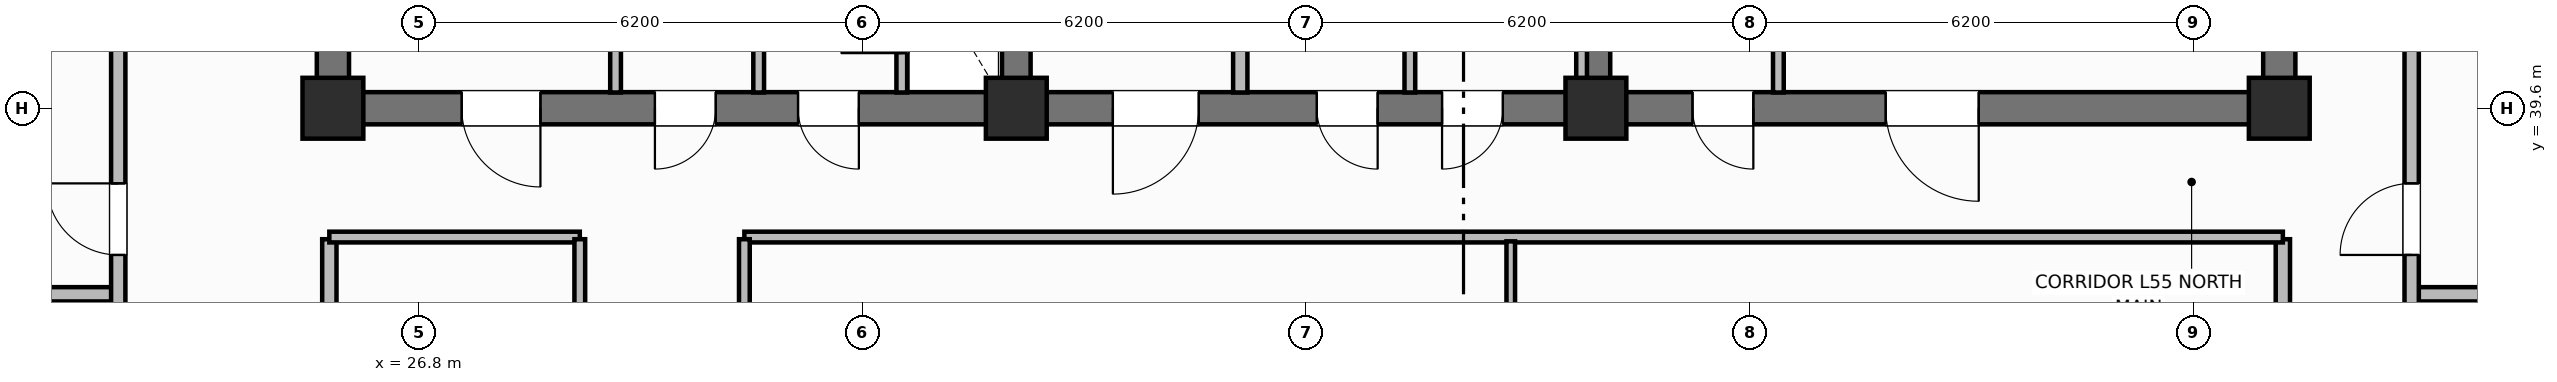
"""IFC4 building model, lengths in metres.
Left out: names, types, materials, properties, quantities, classifications, styles, units other than length and angle.
Written with IfcOpenShell. Run it as: python <this file> out.ifc"""

import sys

from ifc_helpers import new_model, si_unit, direction, frame, frame_2d, origin, origin_2d, place, context, subcontext, project, spatial, rectangle, extrude, element, fill, save


model = new_model("IFC4")
c1 = context("Model", 3, precision=1e-05, world=origin(), true_north=direction((0.0, 1.0)))
c2 = subcontext(c1, "Body", "Model", "MODEL_VIEW")
j1 = project(units=[si_unit("LENGTHUNIT", "METRE"), si_unit("PLANEANGLEUNIT", "RADIAN")], contexts=[c1])
p1 = place(None, origin())
s1 = spatial("IfcSite", under=j1, at=p1, CompositionType="ELEMENT")
p2 = place(p1, origin())
s2 = spatial("IfcBuilding", under=s1, at=p2, CompositionType="ELEMENT")
p3 = place(p2, frame((0.0, 0.0, 222.1)))
s3 = spatial("IfcBuildingStorey", under=s2, at=p3, CompositionType="ELEMENT", Elevation=222.1)
for number, where, z_axis, x_axis in (
    (1, (25.6, 39.825, 0.0), (0.0, 0.0, 1.0), (0.0, 1.0, 0.0)),
    (2, (52.8, 39.825, 0.0), (0.0, 0.0, 1.0), (0.0, 1.0, 0.0)),
):
    element("IfcWall", number, at=place(p3, frame(where, z_axis=z_axis, x_axis=x_axis)), inside=s3, PredefinedType="SHEAR", context=c2, shape_type="SweptSolid", body=[
        extrude(rectangle(XDim=5.75, YDim=0.45, at=frame_2d((2.875, 0.0))), origin(), (0.0, 0.0, 1.0), 3.7),
    ])
p4 = place(p3, frame((52.8, 39.6, 0.0), z_axis=(0.0, 0.0, 1.0), x_axis=(-1.0, 0.0, 0.0)))
e3 = element("IfcWall", 3, at=p4, inside=s3, PredefinedType="SHEAR", context=c2, shape_type="SweptSolid", body=[
    extrude(rectangle(XDim=27.2, YDim=0.45, at=frame_2d((13.6, 0.0))), origin(), (0.0, 0.0, 1.0), 3.7),
])
p5 = place(p4, frame((24.3, 0.0, 0.0)))
e4 = element("IfcOpeningElement", 4, at=p5, cuts=e3, PredefinedType="OPENING", context=c2, shape_type="SweptSolid", body=[
    extrude(rectangle(XDim=1.1, YDim=2.15, at=frame_2d((0.55, 1.075))), frame((0.0, 0.235, 0.0), z_axis=(0.0, -1.0, 0.0), x_axis=(1.0, 0.0, 0.0)), (0.0, 0.0, 1.0), 0.47),
])
p6 = place(p4, frame((21.85, 0.0, 0.0)))
e5 = element("IfcOpeningElement", 5, at=p6, cuts=e3, PredefinedType="OPENING", context=c2, shape_type="SweptSolid", body=[
    extrude(rectangle(XDim=0.85, YDim=2.1, at=frame_2d((0.425, 1.05))), frame((0.0, 0.235, 0.0), z_axis=(0.0, -1.0, 0.0), x_axis=(1.0, 0.0, 0.0)), (0.0, 0.0, 1.0), 0.47),
])
p7 = place(p4, frame((19.85, 0.0, 0.0)))
e6 = element("IfcOpeningElement", 6, at=p7, cuts=e3, PredefinedType="OPENING", context=c2, shape_type="SweptSolid", body=[
    extrude(rectangle(XDim=0.85, YDim=2.1, at=frame_2d((0.425, 1.05))), frame((0.0, 0.235, 0.0), z_axis=(0.0, -1.0, 0.0), x_axis=(1.0, 0.0, 0.0)), (0.0, 0.0, 1.0), 0.47),
])
p8 = place(p4, frame((15.1, 0.0, 0.0)))
e7 = element("IfcOpeningElement", 7, at=p8, cuts=e3, PredefinedType="OPENING", context=c2, shape_type="SweptSolid", body=[
    extrude(rectangle(XDim=1.2, YDim=2.15, at=frame_2d((0.6, 1.075))), frame((0.0, 0.235, 0.0), z_axis=(0.0, -1.0, 0.0), x_axis=(1.0, 0.0, 0.0)), (0.0, 0.0, 1.0), 0.47),
])
p9 = place(p4, frame((12.6, 0.0, 0.0)))
e8 = element("IfcOpeningElement", 8, at=p9, cuts=e3, PredefinedType="OPENING", context=c2, shape_type="SweptSolid", body=[
    extrude(rectangle(XDim=0.85, YDim=2.1, at=frame_2d((0.425, 1.05))), frame((0.0, 0.235, 0.0), z_axis=(0.0, -1.0, 0.0), x_axis=(1.0, 0.0, 0.0)), (0.0, 0.0, 1.0), 0.47),
])
p10 = place(p4, frame((10.85, 0.0, 0.0)))
e9 = element("IfcOpeningElement", 9, at=p10, cuts=e3, PredefinedType="OPENING", context=c2, shape_type="SweptSolid", body=[
    extrude(rectangle(XDim=0.85, YDim=2.1, at=frame_2d((0.425, 1.05))), frame((0.0, 0.235, 0.0), z_axis=(0.0, -1.0, 0.0), x_axis=(1.0, 0.0, 0.0)), (0.0, 0.0, 1.0), 0.47),
])
p11 = place(p4, frame((7.35, 0.0, 0.0)))
e10 = element("IfcOpeningElement", 10, at=p11, cuts=e3, PredefinedType="OPENING", context=c2, shape_type="SweptSolid", body=[
    extrude(rectangle(XDim=0.85, YDim=2.1, at=frame_2d((0.425, 1.05))), frame((0.0, 0.235, 0.0), z_axis=(0.0, -1.0, 0.0), x_axis=(1.0, 0.0, 0.0)), (0.0, 0.0, 1.0), 0.47),
])
p12 = place(p4, frame((4.2, 0.0, 0.0)))
e11 = element("IfcOpeningElement", 11, at=p12, cuts=e3, PredefinedType="OPENING", context=c2, shape_type="SweptSolid", body=[
    extrude(rectangle(XDim=1.3, YDim=2.2, at=frame_2d((0.65, 1.1))), frame((0.0, 0.235, 0.0), z_axis=(0.0, -1.0, 0.0), x_axis=(1.0, 0.0, 0.0)), (0.0, 0.0, 1.0), 0.47),
])
for number, where, z_axis, x_axis in (
    (12, (35.15, 39.825, 0.0), (0.0, 0.0, 1.0), (0.0, 1.0, 0.0)),
    (13, (43.25, 39.825, 0.0), (0.0, 0.0, 1.0), (0.0, 1.0, 0.0)),
):
    element("IfcWall", number, at=place(p3, frame(where, z_axis=z_axis, x_axis=x_axis)), inside=s3, PredefinedType="SHEAR", context=c2, shape_type="SweptSolid", body=[
        extrude(rectangle(XDim=5.75, YDim=0.4, at=frame_2d((2.875, 0.0))), origin(), (0.0, 0.0, 1.0), 3.7),
    ])
for number, where, z_axis, x_axis in (
    (14, (25.6, 39.6, 0.0), (0.0, 0.0, 1.0), (1.0, 0.0, 0.0)),
    (15, (35.15, 39.6, 0.0), (0.0, 0.0, 1.0), (1.0, 0.0, 0.0)),
    (16, (43.25, 39.6, 0.0), (0.0, 0.0, 1.0), (1.0, 0.0, 0.0)),
    (17, (52.8, 39.6, 0.0), (0.0, 0.0, 1.0), (1.0, 0.0, 0.0)),
):
    element("IfcColumn", number, at=place(p3, frame(where, z_axis=z_axis, x_axis=x_axis)), inside=s3, PredefinedType="COLUMN", context=c2, shape_type="SweptSolid", body=[
        extrude(rectangle(XDim=0.85, YDim=0.85, at=origin_2d()), origin(), (0.0, 0.0, 1.0), 3.7),
    ])
p13 = place(p3, frame((33.55, 39.82, 0.0), z_axis=(0.0, 0.0, 1.0), x_axis=(0.0, 1.0, 0.0)))
e18 = element("IfcWall", 18, at=p13, inside=s3, PredefinedType="PARTITIONING", context=c2, shape_type="SweptSolid", body=[
    extrude(rectangle(XDim=2.13, YDim=0.15, at=frame_2d((1.065, 0.0))), origin(), (0.0, 0.0, 1.0), 2.24),
])
p14 = place(p13, frame((0.55, 0.0, 0.0)))
e19 = element("IfcOpeningElement", 19, at=p14, cuts=e18, PredefinedType="OPENING", context=c2, shape_type="SweptSolid", body=[
    extrude(rectangle(XDim=0.85, YDim=2.05, at=frame_2d((0.425, 1.025))), frame((0.0, 0.085, 0.0), z_axis=(0.0, -1.0, 0.0), x_axis=(1.0, 0.0, 0.0)), (0.0, 0.0, 1.0), 0.17),
])
for number, where, z_axis, x_axis in (
    (20, (29.55, 39.82, 0.0), (0.0, 0.0, 1.0), (0.0, 1.0, 0.0)),
    (21, (31.55, 39.82, 0.0), (0.0, 0.0, 1.0), (0.0, 1.0, 0.0)),
):
    element("IfcWall", number, at=place(p3, frame(where, z_axis=z_axis, x_axis=x_axis)), inside=s3, PredefinedType="PARTITIONING", context=c2, shape_type="SweptSolid", body=[
        extrude(rectangle(XDim=2.13, YDim=0.15, at=frame_2d((1.065, 0.0))), origin(), (0.0, 0.0, 1.0), 2.24),
    ])
p15 = place(p3, frame((38.28, 39.82, 0.0), z_axis=(0.0, 0.0, 1.0), x_axis=(0.0, 1.0, 0.0)))
e22 = element("IfcWall", 22, at=p15, inside=s3, PredefinedType="PARTITIONING", context=c2, shape_type="SweptSolid", body=[
    extrude(rectangle(XDim=5.63, YDim=0.2, at=frame_2d((2.815, 0.0))), origin(), (0.0, 0.0, 1.0), 2.24),
])
for number, where, z_axis, x_axis in (
    (23, (43.05, 39.82, 0.0), (0.0, 0.0, 1.0), (0.0, 1.0, 0.0)),
    (24, (40.65, 39.82, 0.0), (0.0, 0.0, 1.0), (0.0, 1.0, 0.0)),
    (25, (45.8, 39.82, 0.0), (0.0, 0.0, 1.0), (0.0, 1.0, 0.0)),
):
    element("IfcWall", number, at=place(p3, frame(where, z_axis=z_axis, x_axis=x_axis)), inside=s3, PredefinedType="PARTITIONING", context=c2, shape_type="SweptSolid", body=[
        extrude(rectangle(XDim=5.63, YDim=0.15, at=frame_2d((2.815, 0.0))), origin(), (0.0, 0.0, 1.0), 2.24),
    ])
for number, where, z_axis, x_axis in (
    (26, (25.55, 18.63, 0.0), (0.0, 0.0, 1.0), (0.0, 1.0, 0.0)),
    (27, (52.85, 18.63, 0.0), (0.0, 0.0, 1.0), (0.0, 1.0, 0.0)),
):
    element("IfcWall", number, at=place(p3, frame(where, z_axis=z_axis, x_axis=x_axis)), inside=s3, PredefinedType="PARTITIONING", context=c2, shape_type="SweptSolid", body=[
        extrude(rectangle(XDim=19.14, YDim=0.2, at=frame_2d((9.57, 0.0))), origin(), (0.0, 0.0, 1.0), 2.24),
    ])
p16 = place(p3, frame((25.55, 37.8, 0.0), z_axis=(0.0, 0.0, 1.0), x_axis=(1.0, 0.0, 0.0)))
e28 = element("IfcWall", 28, at=p16, inside=s3, PredefinedType="PARTITIONING", context=c2, shape_type="SweptSolid", body=[
    extrude(rectangle(XDim=3.5, YDim=0.15, at=frame_2d((1.75, 0.0))), origin(), (0.0, 0.0, 1.0), 2.24),
])
p17 = place(p3, frame((31.35, 37.8, 0.0), z_axis=(0.0, 0.0, 1.0), x_axis=(1.0, 0.0, 0.0)))
e29 = element("IfcWall", 29, at=p17, inside=s3, PredefinedType="PARTITIONING", context=c2, shape_type="SweptSolid", body=[
    extrude(rectangle(XDim=21.5, YDim=0.15, at=frame_2d((10.75, 0.0))), origin(), (0.0, 0.0, 1.0), 2.24),
])
p18 = place(p3, frame((42.06, 29.388, 0.0), z_axis=(0.0, 0.0, 1.0), x_axis=(0.0, 1.0, 0.0)))
e30 = element("IfcWall", 30, at=p18, inside=s3, PredefinedType="PARTITIONING", context=c2, shape_type="SweptSolid", body=[
    extrude(rectangle(XDim=8.352, YDim=0.12, at=frame_2d((4.176, 0.0))), origin(), (0.0, 0.0, 1.0), 2.24),
])
p19 = place(p18, frame((2.0, 0.0, 0.0)))
e31 = element("IfcOpeningElement", 31, at=p19, cuts=e30, PredefinedType="OPENING", context=c2, shape_type="SweptSolid", body=[
    extrude(rectangle(XDim=0.9, YDim=2.1, at=frame_2d((0.45, 1.05))), frame((0.0, 0.07, 0.0), z_axis=(0.0, -1.0, 0.0), x_axis=(1.0, 0.0, 0.0)), (0.0, 0.0, 1.0), 0.14),
])
p20 = place(p3, frame((29.05, 18.63, 0.0), z_axis=(0.0, 0.0, 1.0), x_axis=(0.0, 1.0, 0.0)))
e32 = element("IfcWall", 32, at=p20, inside=s3, PredefinedType="PARTITIONING", context=c2, shape_type="SweptSolid", body=[
    extrude(rectangle(XDim=19.14, YDim=0.15, at=frame_2d((9.57, 0.0))), origin(), (0.0, 0.0, 1.0), 2.24),
])
p21 = place(p20, frame((5.5, 0.0, 0.0)))
e33 = element("IfcOpeningElement", 33, at=p21, cuts=e32, PredefinedType="OPENING", context=c2, shape_type="SweptSolid", body=[
    extrude(rectangle(XDim=1.0, YDim=2.15, at=frame_2d((0.5, 1.075))), frame((0.0, 0.085, 0.0), z_axis=(0.0, -1.0, 0.0), x_axis=(1.0, 0.0, 0.0)), (0.0, 0.0, 1.0), 0.17),
])
p22 = place(p3, frame((31.35, 18.63, 0.0), z_axis=(0.0, 0.0, 1.0), x_axis=(0.0, 1.0, 0.0)))
e34 = element("IfcWall", 34, at=p22, inside=s3, PredefinedType="PARTITIONING", context=c2, shape_type="SweptSolid", body=[
    extrude(rectangle(XDim=19.14, YDim=0.15, at=frame_2d((9.57, 0.0))), origin(), (0.0, 0.0, 1.0), 2.24),
])
p23 = place(p22, frame((2.2, 0.0, 0.0)))
e35 = element("IfcOpeningElement", 35, at=p23, cuts=e34, PredefinedType="OPENING", context=c2, shape_type="SweptSolid", body=[
    extrude(rectangle(XDim=1.0, YDim=2.15, at=frame_2d((0.5, 1.075))), frame((0.0, 0.085, 0.0), z_axis=(0.0, -1.0, 0.0), x_axis=(1.0, 0.0, 0.0)), (0.0, 0.0, 1.0), 0.17),
])
p24 = place(p22, frame((12.719, 0.0, 0.0)))
e36 = element("IfcOpeningElement", 36, at=p24, cuts=e34, PredefinedType="OPENING", context=c2, shape_type="SweptSolid", body=[
    extrude(rectangle(XDim=1.0, YDim=2.15, at=frame_2d((0.5, 1.075))), frame((0.0, 0.085, 0.0), z_axis=(0.0, -1.0, 0.0), x_axis=(1.0, 0.0, 0.0)), (0.0, 0.0, 1.0), 0.17),
])
p25 = place(p3, frame((16.57, 37.0, 0.0), z_axis=(0.0, 0.0, 1.0), x_axis=(1.0, 0.0, 0.0)))
e37 = element("IfcWall", 37, at=p25, inside=s3, PredefinedType="PARTITIONING", context=c2, shape_type="SweptSolid", body=[
    extrude(rectangle(XDim=6.03, YDim=0.2, at=frame_2d((3.015, 0.0))), origin(), (0.0, 0.0, 1.0), 2.24),
])
p26 = place(p3, frame((22.6, 10.6, 0.0), z_axis=(0.0, 0.0, 1.0), x_axis=(0.0, 1.0, 0.0)))
e38 = element("IfcWall", 38, at=p26, inside=s3, PredefinedType="PARTITIONING", context=c2, shape_type="SweptSolid", body=[
    extrude(rectangle(XDim=35.2, YDim=0.2, at=frame_2d((17.6, 0.0))), origin(), (0.0, 0.0, 1.0), 2.24),
])
p27 = place(p26, frame((2.65, 0.0, 0.0)))
e39 = element("IfcOpeningElement", 39, at=p27, cuts=e38, PredefinedType="OPENING", context=c2, shape_type="SweptSolid", body=[
    extrude(rectangle(XDim=1.0, YDim=2.15, at=frame_2d((0.5, 1.075))), frame((0.0, 0.11, 0.0), z_axis=(0.0, -1.0, 0.0), x_axis=(1.0, 0.0, 0.0)), (0.0, 0.0, 1.0), 0.22),
])
p28 = place(p26, frame((10.81, 0.0, 0.0)))
e40 = element("IfcOpeningElement", 40, at=p28, cuts=e38, PredefinedType="OPENING", context=c2, shape_type="SweptSolid", body=[
    extrude(rectangle(XDim=1.0, YDim=2.15, at=frame_2d((0.5, 1.075))), frame((0.0, 0.11, 0.0), z_axis=(0.0, -1.0, 0.0), x_axis=(1.0, 0.0, 0.0)), (0.0, 0.0, 1.0), 0.22),
])
p29 = place(p26, frame((19.54, 0.0, 0.0)))
e41 = element("IfcOpeningElement", 41, at=p29, cuts=e38, PredefinedType="OPENING", context=c2, shape_type="SweptSolid", body=[
    extrude(rectangle(XDim=1.0, YDim=2.15, at=frame_2d((0.5, 1.075))), frame((0.0, 0.11, 0.0), z_axis=(0.0, -1.0, 0.0), x_axis=(1.0, 0.0, 0.0)), (0.0, 0.0, 1.0), 0.22),
])
p30 = place(p26, frame((26.95, 0.0, 0.0)))
e42 = element("IfcOpeningElement", 42, at=p30, cuts=e38, PredefinedType="OPENING", context=c2, shape_type="SweptSolid", body=[
    extrude(rectangle(XDim=1.0, YDim=2.15, at=frame_2d((0.5, 1.075))), frame((0.0, 0.11, 0.0), z_axis=(0.0, -1.0, 0.0), x_axis=(1.0, 0.0, 0.0)), (0.0, 0.0, 1.0), 0.22),
])
p31 = place(p3, frame((54.65, 37.0, 0.0), z_axis=(0.0, 0.0, 1.0), x_axis=(1.0, 0.0, 0.0)))
e43 = element("IfcWall", 43, at=p31, inside=s3, PredefinedType="PARTITIONING", context=c2, shape_type="SweptSolid", body=[
    extrude(rectangle(XDim=7.18, YDim=0.2, at=frame_2d((3.59, 0.0))), origin(), (0.0, 0.0, 1.0), 2.24),
])
p32 = place(p3, frame((54.65, 10.6, 0.0), z_axis=(0.0, 0.0, 1.0), x_axis=(0.0, 1.0, 0.0)))
e44 = element("IfcWall", 44, at=p32, inside=s3, PredefinedType="PARTITIONING", context=c2, shape_type="SweptSolid", body=[
    extrude(rectangle(XDim=35.2, YDim=0.2, at=frame_2d((17.6, 0.0))), origin(), (0.0, 0.0, 1.0), 2.24),
])
p33 = place(p32, frame((2.65, 0.0, 0.0)))
e45 = element("IfcOpeningElement", 45, at=p33, cuts=e44, PredefinedType="OPENING", context=c2, shape_type="SweptSolid", body=[
    extrude(rectangle(XDim=1.0, YDim=2.15, at=frame_2d((0.5, 1.075))), frame((0.0, 0.11, 0.0), z_axis=(0.0, -1.0, 0.0), x_axis=(1.0, 0.0, 0.0)), (0.0, 0.0, 1.0), 0.22),
])
p34 = place(p32, frame((10.81, 0.0, 0.0)))
e46 = element("IfcOpeningElement", 46, at=p34, cuts=e44, PredefinedType="OPENING", context=c2, shape_type="SweptSolid", body=[
    extrude(rectangle(XDim=1.0, YDim=2.15, at=frame_2d((0.5, 1.075))), frame((0.0, 0.11, 0.0), z_axis=(0.0, -1.0, 0.0), x_axis=(1.0, 0.0, 0.0)), (0.0, 0.0, 1.0), 0.22),
])
p35 = place(p32, frame((19.54, 0.0, 0.0)))
e47 = element("IfcOpeningElement", 47, at=p35, cuts=e44, PredefinedType="OPENING", context=c2, shape_type="SweptSolid", body=[
    extrude(rectangle(XDim=1.0, YDim=2.15, at=frame_2d((0.5, 1.075))), frame((0.0, 0.11, 0.0), z_axis=(0.0, -1.0, 0.0), x_axis=(1.0, 0.0, 0.0)), (0.0, 0.0, 1.0), 0.22),
])
p36 = place(p32, frame((26.95, 0.0, 0.0)))
e48 = element("IfcOpeningElement", 48, at=p36, cuts=e44, PredefinedType="OPENING", context=c2, shape_type="SweptSolid", body=[
    extrude(rectangle(XDim=1.0, YDim=2.15, at=frame_2d((0.5, 1.075))), frame((0.0, 0.11, 0.0), z_axis=(0.0, -1.0, 0.0), x_axis=(1.0, 0.0, 0.0)), (0.0, 0.0, 1.0), 0.22),
])
p37 = place(p14, origin())
e49 = element("IfcDoor", 49, at=p37, inside=s3, OperationType="SINGLE_SWING_LEFT", PredefinedType="TRAPDOOR", context=c2, shape_type="SweptSolid", body=[
    extrude(rectangle(XDim=0.85, YDim=2.05, at=frame_2d((0.425, 1.025))), frame((0.0, 0.025, 0.0), z_axis=(0.0, -1.0, 0.0), x_axis=(1.0, 0.0, 0.0)), (0.0, 0.0, 1.0), 0.05),
])
fill(e19, e49)
p38 = place(p30, origin())
e50 = element("IfcDoor", 50, at=p38, inside=s3, OperationType="SINGLE_SWING_RIGHT", PredefinedType="DOOR", context=c2, shape_type="SweptSolid", body=[
    extrude(rectangle(XDim=1.0, YDim=2.15, at=frame_2d((0.5, 1.075))), frame((0.0, 0.025, 0.0), z_axis=(0.0, -1.0, 0.0), x_axis=(1.0, 0.0, 0.0)), (0.0, 0.0, 1.0), 0.05),
])
fill(e42, e50)
p39 = place(p36, origin())
e51 = element("IfcDoor", 51, at=p39, inside=s3, OperationType="SINGLE_SWING_LEFT", PredefinedType="DOOR", context=c2, shape_type="SweptSolid", body=[
    extrude(rectangle(XDim=1.0, YDim=2.15, at=frame_2d((0.5, 1.075))), frame((0.0, 0.025, 0.0), z_axis=(0.0, -1.0, 0.0), x_axis=(1.0, 0.0, 0.0)), (0.0, 0.0, 1.0), 0.05),
])
fill(e48, e51)
p40 = place(p5, origin())
e52 = element("IfcDoor", 52, at=p40, inside=s3, OperationType="SINGLE_SWING_LEFT", PredefinedType="DOOR", context=c2, shape_type="SweptSolid", body=[
    extrude(rectangle(XDim=1.1, YDim=2.15, at=frame_2d((0.55, 1.075))), frame((0.0, 0.025, 0.0), z_axis=(0.0, -1.0, 0.0), x_axis=(1.0, 0.0, 0.0)), (0.0, 0.0, 1.0), 0.05),
])
fill(e4, e52)
p41 = place(p6, origin())
e53 = element("IfcDoor", 53, at=p41, inside=s3, OperationType="SINGLE_SWING_RIGHT", PredefinedType="DOOR", context=c2, shape_type="SweptSolid", body=[
    extrude(rectangle(XDim=0.85, YDim=2.1, at=frame_2d((0.425, 1.05))), frame((0.0, 0.025, 0.0), z_axis=(0.0, -1.0, 0.0), x_axis=(1.0, 0.0, 0.0)), (0.0, 0.0, 1.0), 0.05),
])
fill(e5, e53)
p42 = place(p7, origin())
e54 = element("IfcDoor", 54, at=p42, inside=s3, OperationType="SINGLE_SWING_LEFT", PredefinedType="DOOR", context=c2, shape_type="SweptSolid", body=[
    extrude(rectangle(XDim=0.85, YDim=2.1, at=frame_2d((0.425, 1.05))), frame((0.0, 0.025, 0.0), z_axis=(0.0, -1.0, 0.0), x_axis=(1.0, 0.0, 0.0)), (0.0, 0.0, 1.0), 0.05),
])
fill(e6, e54)
p43 = place(p8, origin())
e55 = element("IfcDoor", 55, at=p43, inside=s3, OperationType="SINGLE_SWING_RIGHT", PredefinedType="DOOR", context=c2, shape_type="SweptSolid", body=[
    extrude(rectangle(XDim=1.2, YDim=2.15, at=frame_2d((0.6, 1.075))), frame((0.0, 0.025, 0.0), z_axis=(0.0, -1.0, 0.0), x_axis=(1.0, 0.0, 0.0)), (0.0, 0.0, 1.0), 0.05),
])
fill(e7, e55)
p44 = place(p9, origin())
e56 = element("IfcDoor", 56, at=p44, inside=s3, OperationType="SINGLE_SWING_LEFT", PredefinedType="DOOR", context=c2, shape_type="SweptSolid", body=[
    extrude(rectangle(XDim=0.85, YDim=2.1, at=frame_2d((0.425, 1.05))), frame((0.0, 0.025, 0.0), z_axis=(0.0, -1.0, 0.0), x_axis=(1.0, 0.0, 0.0)), (0.0, 0.0, 1.0), 0.05),
])
fill(e8, e56)
p45 = place(p10, origin())
e57 = element("IfcDoor", 57, at=p45, inside=s3, OperationType="SINGLE_SWING_RIGHT", PredefinedType="DOOR", context=c2, shape_type="SweptSolid", body=[
    extrude(rectangle(XDim=0.85, YDim=2.1, at=frame_2d((0.425, 1.05))), frame((0.0, 0.025, 0.0), z_axis=(0.0, -1.0, 0.0), x_axis=(1.0, 0.0, 0.0)), (0.0, 0.0, 1.0), 0.05),
])
fill(e9, e57)
p46 = place(p11, origin())
e58 = element("IfcDoor", 58, at=p46, inside=s3, OperationType="SINGLE_SWING_LEFT", PredefinedType="DOOR", context=c2, shape_type="SweptSolid", body=[
    extrude(rectangle(XDim=0.85, YDim=2.1, at=frame_2d((0.425, 1.05))), frame((0.0, 0.025, 0.0), z_axis=(0.0, -1.0, 0.0), x_axis=(1.0, 0.0, 0.0)), (0.0, 0.0, 1.0), 0.05),
])
fill(e10, e58)
p47 = place(p12, origin())
e59 = element("IfcDoor", 59, at=p47, inside=s3, OperationType="SINGLE_SWING_LEFT", PredefinedType="DOOR", context=c2, shape_type="SweptSolid", body=[
    extrude(rectangle(XDim=1.3, YDim=2.2, at=frame_2d((0.65, 1.1))), frame((0.0, 0.025, 0.0), z_axis=(0.0, -1.0, 0.0), x_axis=(1.0, 0.0, 0.0)), (0.0, 0.0, 1.0), 0.05),
])
fill(e11, e59)
save(model, sys.argv[1])
